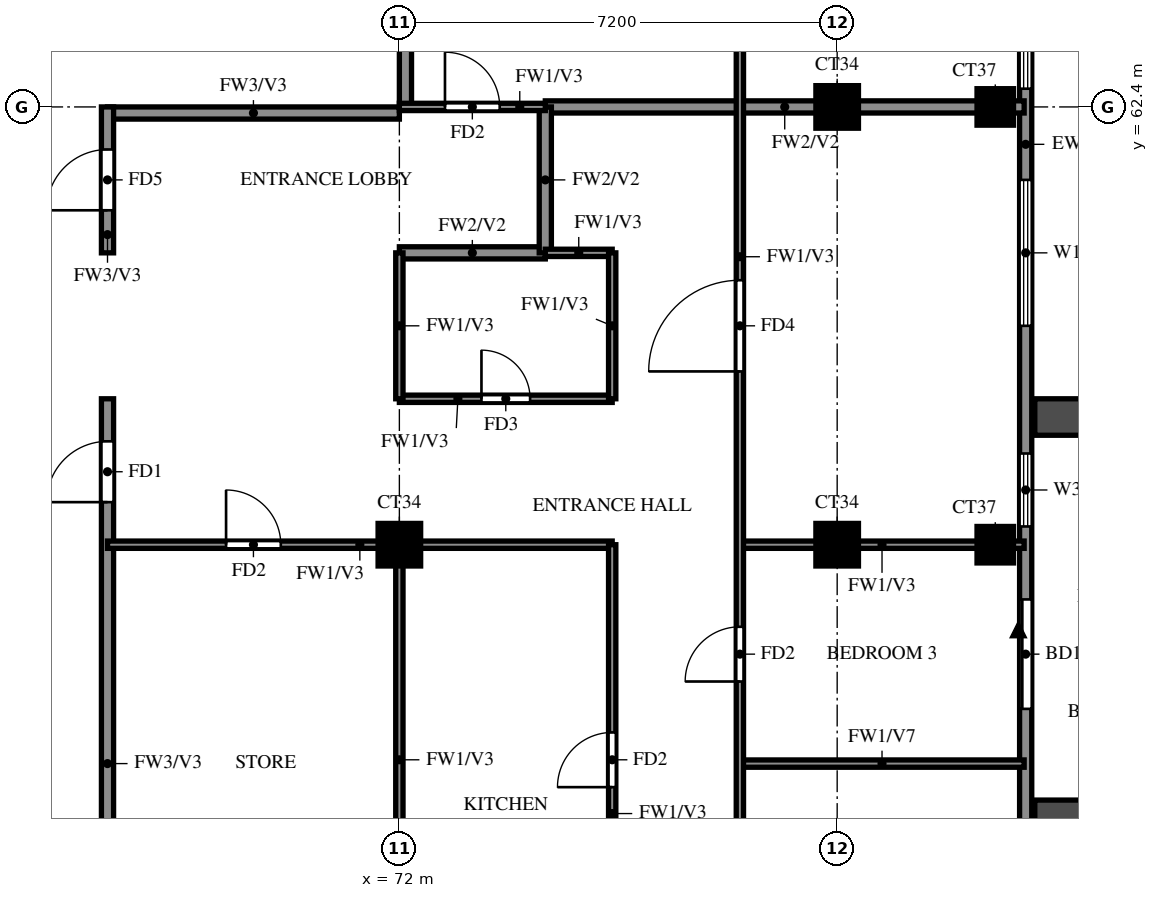
"""IFC4 building model, lengths in metres.
Left out: names, types, materials, properties, quantities, classifications, styles, units other than length and angle.
Written with IfcOpenShell. Run it as: python <this file> out.ifc"""

import sys

from ifc_helpers import new_model, si_unit, direction, frame, frame_2d, origin, origin_2d, place, context, subcontext, project, spatial, rectangle, extrude, source, transform, mapped, element, fill, save


model = new_model("IFC4")
c1 = context("Model", 3, precision=1e-05, world=origin(), true_north=direction((0.0, 1.0)))
c2 = subcontext(c1, "Body", "Model", "MODEL_VIEW")
j1 = project(units=[si_unit("LENGTHUNIT", "METRE"), si_unit("PLANEANGLEUNIT", "RADIAN")], contexts=[c1])
p1 = place(None, origin())
s1 = spatial("IfcSite", under=j1, at=p1, CompositionType="ELEMENT")
p2 = place(p1, origin())
s2 = spatial("IfcBuilding", under=s1, at=p2, CompositionType="ELEMENT")
p3 = place(p2, frame((0.0, 0.0, 253.5)))
s3 = spatial("IfcBuildingStorey", under=s2, at=p3, CompositionType="ELEMENT", Elevation=253.5)
m1 = source(origin(), c2, "Body", "SweptSolid", [
    extrude(rectangle(XDim=0.7, YDim=0.7, at=origin_2d()), origin(), (0.0, 0.0, 1.0), 3.22),
])
for number, where, z_axis, x_axis in (
    (1, (72.0, 55.2, 0.0), (0.0, 0.0, 1.0), (1.0, 0.0, 0.0)),
    (2, (79.2, 55.2, 0.0), (0.0, 0.0, 1.0), (1.0, 0.0, 0.0)),
):
    element("IfcColumn", number, at=place(p3, frame(where, z_axis=z_axis, x_axis=x_axis)), inside=s3, PredefinedType="COLUMN", context=c2, shape_type="MappedRepresentation", body=[
        mapped(m1, transform((0.0, 0.0, 0.0))),
    ])
m2 = source(origin(), c2, "Body", "SweptSolid", [
    extrude(rectangle(XDim=0.6, YDim=0.6, at=origin_2d()), origin(), (0.0, 0.0, 1.0), 3.22),
])
p4 = place(p3, frame((81.8, 55.2, 0.0), z_axis=(0.0, 0.0, 1.0), x_axis=(1.0, 0.0, 0.0)))
e3 = element("IfcColumn", 3, at=p4, inside=s3, PredefinedType="COLUMN", context=c2, shape_type="MappedRepresentation", body=[
    mapped(m2, transform((0.0, 0.0, 0.0))),
])
p5 = place(p3, frame((79.2, 62.4, 0.0), z_axis=(0.0, 0.0, 1.0), x_axis=(1.0, 0.0, 0.0)))
e4 = element("IfcColumn", 4, at=p5, inside=s3, PredefinedType="COLUMN", context=c2, shape_type="MappedRepresentation", body=[
    mapped(m1, transform((0.0, 0.0, 0.0))),
])
p6 = place(p3, frame((81.8, 62.4, 0.0), z_axis=(0.0, 0.0, 1.0), x_axis=(1.0, 0.0, 0.0)))
e5 = element("IfcColumn", 5, at=p6, inside=s3, PredefinedType="COLUMN", context=c2, shape_type="MappedRepresentation", body=[
    mapped(m2, transform((0.0, 0.0, 0.0))),
])
p7 = place(p3, frame((82.3, 48.2, 0.0), z_axis=(0.0, 0.0, 1.0), x_axis=(0.0, 1.0, 0.0)))
e6 = element("IfcWall", 6, at=p7, inside=s3, PredefinedType="SOLIDWALL", context=c2, shape_type="SweptSolid", body=[
    extrude(rectangle(XDim=28.6, YDim=0.2, at=frame_2d((14.3, 0.0))), origin(), (0.0, 0.0, 1.0), 3.22),
])
p8 = place(p7, frame((4.3, 0.0, 0.0)))
e7 = element("IfcOpeningElement", 7, at=p8, cuts=e6, PredefinedType="OPENING", context=c2, shape_type="SweptSolid", body=[
    extrude(rectangle(XDim=1.8, YDim=2.4, at=frame_2d((0.9, 1.2))), frame((0.0, 0.11, 0.0), z_axis=(0.0, -1.0, 0.0), x_axis=(1.0, 0.0, 0.0)), (0.0, 0.0, 1.0), 0.22),
])
p9 = place(p7, frame((18.7, 0.0, 0.0)))
e8 = element("IfcOpeningElement", 8, at=p9, cuts=e6, PredefinedType="OPENING", context=c2, shape_type="SweptSolid", body=[
    extrude(rectangle(XDim=1.8, YDim=2.4, at=frame_2d((0.9, 1.2))), frame((0.0, 0.11, 0.0), z_axis=(0.0, -1.0, 0.0), x_axis=(1.0, 0.0, 0.0)), (0.0, 0.0, 1.0), 0.22),
])
p10 = place(p7, frame((0.6, 0.0, 0.6)))
e9 = element("IfcOpeningElement", 9, at=p10, cuts=e6, PredefinedType="OPENING", context=c2, shape_type="SweptSolid", body=[
    extrude(rectangle(XDim=1.2, YDim=2.4, at=frame_2d((0.6, 1.2))), frame((0.0, 0.11, 0.0), z_axis=(0.0, -1.0, 0.0), x_axis=(1.0, 0.0, 0.0)), (0.0, 0.0, 1.0), 0.22),
])
p11 = place(p7, frame((7.3, 0.0, 0.6)))
e10 = element("IfcOpeningElement", 10, at=p11, cuts=e6, PredefinedType="OPENING", context=c2, shape_type="SweptSolid", body=[
    extrude(rectangle(XDim=1.2, YDim=2.4, at=frame_2d((0.6, 1.2))), frame((0.0, 0.11, 0.0), z_axis=(0.0, -1.0, 0.0), x_axis=(1.0, 0.0, 0.0)), (0.0, 0.0, 1.0), 0.22),
])
p12 = place(p7, frame((10.6, 0.0, 0.6)))
e11 = element("IfcOpeningElement", 11, at=p12, cuts=e6, PredefinedType="OPENING", context=c2, shape_type="SweptSolid", body=[
    extrude(rectangle(XDim=2.4, YDim=2.4, at=frame_2d((1.2, 1.2))), frame((0.0, 0.11, 0.0), z_axis=(0.0, -1.0, 0.0), x_axis=(1.0, 0.0, 0.0)), (0.0, 0.0, 1.0), 0.22),
])
p13 = place(p7, frame((14.5, 0.0, 0.6)))
e12 = element("IfcOpeningElement", 12, at=p13, cuts=e6, PredefinedType="OPENING", context=c2, shape_type="SweptSolid", body=[
    extrude(rectangle(XDim=1.8, YDim=2.4, at=frame_2d((0.9, 1.2))), frame((0.0, 0.11, 0.0), z_axis=(0.0, -1.0, 0.0), x_axis=(1.0, 0.0, 0.0)), (0.0, 0.0, 1.0), 0.22),
])
p14 = place(p7, frame((21.85, 0.0, 1.5)))
e13 = element("IfcOpeningElement", 13, at=p14, cuts=e6, PredefinedType="OPENING", context=c2, shape_type="SweptSolid", body=[
    extrude(rectangle(XDim=0.9, YDim=0.9, at=frame_2d((0.45, 0.45))), frame((0.0, 0.11, 0.0), z_axis=(0.0, -1.0, 0.0), x_axis=(1.0, 0.0, 0.0)), (0.0, 0.0, 1.0), 0.22),
])
p15 = place(p7, frame((23.95, 0.0, 1.5)))
e14 = element("IfcOpeningElement", 14, at=p15, cuts=e6, PredefinedType="OPENING", context=c2, shape_type="SweptSolid", body=[
    extrude(rectangle(XDim=0.9, YDim=0.9, at=frame_2d((0.45, 0.45))), frame((0.0, 0.11, 0.0), z_axis=(0.0, -1.0, 0.0), x_axis=(1.0, 0.0, 0.0)), (0.0, 0.0, 1.0), 0.22),
])
p16 = place(p7, frame((25.5, 0.0, 0.6)))
e15 = element("IfcOpeningElement", 15, at=p16, cuts=e6, PredefinedType="OPENING", context=c2, shape_type="SweptSolid", body=[
    extrude(rectangle(XDim=2.4, YDim=2.4, at=frame_2d((1.2, 1.2))), frame((0.0, 0.11, 0.0), z_axis=(0.0, -1.0, 0.0), x_axis=(1.0, 0.0, 0.0)), (0.0, 0.0, 1.0), 0.22),
])
for number, where, z_axis, x_axis in (
    (16, (82.45, 50.7, 0.0), (0.0, 0.0, 1.0), (1.0, 0.0, 0.0)),
    (17, (82.45, 57.3, 0.0), (0.0, 0.0, 1.0), (1.0, 0.0, 0.0)),
):
    element("IfcWall", number, at=place(p3, frame(where, z_axis=z_axis, x_axis=x_axis)), inside=s3, PredefinedType="SOLIDWALL", context=c2, shape_type="SweptSolid", body=[
        extrude(rectangle(XDim=2.65, YDim=0.6, at=frame_2d((1.325, 0.0))), origin(), (0.0, 0.0, 1.0), 2.85),
    ])
p17 = place(p3, frame((67.2, 62.3, 0.0), z_axis=(0.0, 0.0, 1.0), x_axis=(1.0, 0.0, 0.0)))
e18 = element("IfcWall", 18, at=p17, inside=s3, PredefinedType="SOLIDWALL", context=c2, shape_type="SweptSolid", body=[
    extrude(rectangle(XDim=4.8, YDim=0.2, at=frame_2d((2.4, 0.0))), origin(), (0.0, 0.0, 1.0), 3.22),
])
p18 = place(p3, frame((67.2, 45.6, 0.0), z_axis=(0.0, 0.0, 1.0), x_axis=(0.0, 1.0, 0.0)))
e19 = element("IfcWall", 19, at=p18, inside=s3, PredefinedType="SOLIDWALL", context=c2, shape_type="SweptSolid", body=[
    extrude(rectangle(XDim=12.0, YDim=0.2, at=frame_2d((6.0, 0.0))), origin(), (0.0, 0.0, 1.0), 3.22),
])
p19 = place(p18, frame((10.3, 0.0, 0.0)))
e20 = element("IfcOpeningElement", 20, at=p19, cuts=e19, PredefinedType="OPENING", context=c2, shape_type="SweptSolid", body=[
    extrude(rectangle(XDim=1.0, YDim=2.1, at=frame_2d((0.5, 1.05))), frame((0.0, 0.11, 0.0), z_axis=(0.0, -1.0, 0.0), x_axis=(1.0, 0.0, 0.0)), (0.0, 0.0, 1.0), 0.22),
])
p20 = place(p18, frame((0.7, 0.0, 0.0)))
e21 = element("IfcOpeningElement", 21, at=p20, cuts=e19, PredefinedType="OPENING", context=c2, shape_type="SweptSolid", body=[
    extrude(rectangle(XDim=1.0, YDim=2.1, at=frame_2d((0.5, 1.05))), frame((0.0, 0.11, 0.0), z_axis=(0.0, -1.0, 0.0), x_axis=(1.0, 0.0, 0.0)), (0.0, 0.0, 1.0), 0.22),
])
p21 = place(p3, frame((67.2, 60.0, 0.0), z_axis=(0.0, 0.0, 1.0), x_axis=(0.0, 1.0, 0.0)))
e22 = element("IfcWall", 22, at=p21, inside=s3, PredefinedType="SOLIDWALL", context=c2, shape_type="SweptSolid", body=[
    extrude(rectangle(XDim=2.4, YDim=0.2, at=frame_2d((1.2, 0.0))), origin(), (0.0, 0.0, 1.0), 3.22),
])
p22 = place(p21, frame((0.7, 0.0, 0.0)))
e23 = element("IfcOpeningElement", 23, at=p22, cuts=e22, PredefinedType="OPENING", context=c2, shape_type="SweptSolid", body=[
    extrude(rectangle(XDim=1.0, YDim=2.1, at=frame_2d((0.5, 1.05))), frame((0.0, 0.11, 0.0), z_axis=(0.0, -1.0, 0.0), x_axis=(1.0, 0.0, 0.0)), (0.0, 0.0, 1.0), 0.22),
])
p23 = place(p3, frame((72.1, 62.4, 0.0), z_axis=(0.0, 0.0, 1.0), x_axis=(0.0, 1.0, 0.0)))
e24 = element("IfcWall", 24, at=p23, inside=s3, PredefinedType="SOLIDWALL", context=c2, shape_type="SweptSolid", body=[
    extrude(rectangle(XDim=15.6, YDim=0.2, at=frame_2d((7.8, 0.0))), origin(), (0.0, 0.0, 1.0), 3.22),
])
p24 = place(p3, frame((72.0, 60.0, 0.0), z_axis=(0.0, 0.0, 1.0), x_axis=(1.0, 0.0, 0.0)))
e25 = element("IfcWall", 25, at=p24, inside=s3, PredefinedType="SOLIDWALL", context=c2, shape_type="SweptSolid", body=[
    extrude(rectangle(XDim=2.4, YDim=0.2, at=frame_2d((1.2, 0.0))), origin(), (0.0, 0.0, 1.0), 3.22),
])
p25 = place(p3, frame((74.4, 62.4, 0.0), z_axis=(0.0, 0.0, 1.0), x_axis=(1.0, 0.0, 0.0)))
e26 = element("IfcWall", 26, at=p25, inside=s3, PredefinedType="SOLIDWALL", context=c2, shape_type="SweptSolid", body=[
    extrude(rectangle(XDim=7.875, YDim=0.2, at=frame_2d((3.938, 0.0))), origin(), (0.0, 0.0, 1.0), 3.22),
])
p26 = place(p3, frame((74.4, 60.0, 0.0), z_axis=(0.0, 0.0, 1.0), x_axis=(0.0, 1.0, 0.0)))
e27 = element("IfcWall", 27, at=p26, inside=s3, PredefinedType="SOLIDWALL", context=c2, shape_type="SweptSolid", body=[
    extrude(rectangle(XDim=2.4, YDim=0.2, at=frame_2d((1.2, 0.0))), origin(), (0.0, 0.0, 1.0), 3.22),
])
p27 = place(p3, frame((77.6, 51.6, 0.0), z_axis=(0.0, 0.0, 1.0), x_axis=(1.0, 0.0, 0.0)))
e28 = element("IfcWall", 28, at=p27, inside=s3, PredefinedType="PARTITIONING", context=c2, shape_type="SweptSolid", body=[
    extrude(rectangle(XDim=4.675, YDim=0.12, at=frame_2d((2.337, 0.0))), origin(), (0.0, 0.0, 1.0), 2.32),
])
p28 = place(p3, frame((67.2, 55.2, 0.0), z_axis=(0.0, 0.0, 1.0), x_axis=(1.0, 0.0, 0.0)))
e29 = element("IfcWall", 29, at=p28, inside=s3, PredefinedType="PARTITIONING", context=c2, shape_type="SweptSolid", body=[
    extrude(rectangle(XDim=8.3, YDim=0.12, at=frame_2d((4.15, 0.0))), origin(), (0.0, 0.0, 1.0), 3.22),
])
p29 = place(p28, frame((1.95, 0.0, 0.0)))
e30 = element("IfcOpeningElement", 30, at=p29, cuts=e29, PredefinedType="OPENING", context=c2, shape_type="SweptSolid", body=[
    extrude(rectangle(XDim=0.9, YDim=2.1, at=frame_2d((0.45, 1.05))), frame((0.0, 0.07, 0.0), z_axis=(0.0, -1.0, 0.0), x_axis=(1.0, 0.0, 0.0)), (0.0, 0.0, 1.0), 0.14),
])
p30 = place(p3, frame((77.6, 55.2, 0.0), z_axis=(0.0, 0.0, 1.0), x_axis=(1.0, 0.0, 0.0)))
e31 = element("IfcWall", 31, at=p30, inside=s3, PredefinedType="PARTITIONING", context=c2, shape_type="SweptSolid", body=[
    extrude(rectangle(XDim=4.675, YDim=0.12, at=frame_2d((2.337, 0.0))), origin(), (0.0, 0.0, 1.0), 3.22),
])
p31 = place(p3, frame((72.0, 57.6, 0.0), z_axis=(0.0, 0.0, 1.0), x_axis=(1.0, 0.0, 0.0)))
e32 = element("IfcWall", 32, at=p31, inside=s3, PredefinedType="PARTITIONING", context=c2, shape_type="SweptSolid", body=[
    extrude(rectangle(XDim=3.5, YDim=0.12, at=frame_2d((1.75, 0.0))), origin(), (0.0, 0.0, 1.0), 3.22),
])
p32 = place(p31, frame((1.35, 0.0, 0.0)))
e33 = element("IfcOpeningElement", 33, at=p32, cuts=e32, PredefinedType="OPENING", context=c2, shape_type="SweptSolid", body=[
    extrude(rectangle(XDim=0.8, YDim=2.1, at=frame_2d((0.4, 1.05))), frame((0.0, 0.07, 0.0), z_axis=(0.0, -1.0, 0.0), x_axis=(1.0, 0.0, 0.0)), (0.0, 0.0, 1.0), 0.14),
])
p33 = place(p3, frame((74.4, 60.0, 0.0), z_axis=(0.0, 0.0, 1.0), x_axis=(1.0, 0.0, 0.0)))
e34 = element("IfcWall", 34, at=p33, inside=s3, PredefinedType="PARTITIONING", context=c2, shape_type="SweptSolid", body=[
    extrude(rectangle(XDim=1.1, YDim=0.12, at=frame_2d((0.55, 0.0))), origin(), (0.0, 0.0, 1.0), 3.22),
])
p34 = place(p3, frame((72.0, 62.4, 0.0), z_axis=(0.0, 0.0, 1.0), x_axis=(1.0, 0.0, 0.0)))
e35 = element("IfcWall", 35, at=p34, inside=s3, PredefinedType="PARTITIONING", context=c2, shape_type="SweptSolid", body=[
    extrude(rectangle(XDim=2.4, YDim=0.12, at=frame_2d((1.2, 0.0))), origin(), (0.0, 0.0, 1.0), 3.22),
])
p35 = place(p34, frame((0.75, 0.0, 0.0)))
e36 = element("IfcOpeningElement", 36, at=p35, cuts=e35, PredefinedType="OPENING", context=c2, shape_type="SweptSolid", body=[
    extrude(rectangle(XDim=0.9, YDim=2.1, at=frame_2d((0.45, 1.05))), frame((0.0, 0.07, 0.0), z_axis=(0.0, -1.0, 0.0), x_axis=(1.0, 0.0, 0.0)), (0.0, 0.0, 1.0), 0.14),
])
p36 = place(p3, frame((72.0, 48.125, 0.0), z_axis=(0.0, 0.0, 1.0), x_axis=(0.0, 1.0, 0.0)))
e37 = element("IfcWall", 37, at=p36, inside=s3, PredefinedType="PARTITIONING", context=c2, shape_type="SweptSolid", body=[
    extrude(rectangle(XDim=7.075, YDim=0.12, at=frame_2d((3.538, 0.0))), origin(), (0.0, 0.0, 1.0), 3.22),
])
p37 = place(p3, frame((72.0, 57.6, 0.0), z_axis=(0.0, 0.0, 1.0), x_axis=(0.0, 1.0, 0.0)))
e38 = element("IfcWall", 38, at=p37, inside=s3, PredefinedType="PARTITIONING", context=c2, shape_type="SweptSolid", body=[
    extrude(rectangle(XDim=2.4, YDim=0.12, at=frame_2d((1.2, 0.0))), origin(), (0.0, 0.0, 1.0), 3.22),
])
p38 = place(p3, frame((75.5, 48.125, 0.0), z_axis=(0.0, 0.0, 1.0), x_axis=(0.0, 1.0, 0.0)))
e39 = element("IfcWall", 39, at=p38, inside=s3, PredefinedType="PARTITIONING", context=c2, shape_type="SweptSolid", body=[
    extrude(rectangle(XDim=7.075, YDim=0.12, at=frame_2d((3.538, 0.0))), origin(), (0.0, 0.0, 1.0), 3.22),
])
p39 = place(p38, frame((3.087, 0.0, 0.0)))
e40 = element("IfcOpeningElement", 40, at=p39, cuts=e39, PredefinedType="OPENING", context=c2, shape_type="SweptSolid", body=[
    extrude(rectangle(XDim=0.9, YDim=2.1, at=frame_2d((0.45, 1.05))), frame((0.0, 0.07, 0.0), z_axis=(0.0, -1.0, 0.0), x_axis=(1.0, 0.0, 0.0)), (0.0, 0.0, 1.0), 0.14),
])
p40 = place(p3, frame((75.5, 57.6, 0.0), z_axis=(0.0, 0.0, 1.0), x_axis=(0.0, 1.0, 0.0)))
e41 = element("IfcWall", 41, at=p40, inside=s3, PredefinedType="PARTITIONING", context=c2, shape_type="SweptSolid", body=[
    extrude(rectangle(XDim=2.4, YDim=0.12, at=frame_2d((1.2, 0.0))), origin(), (0.0, 0.0, 1.0), 3.22),
])
p41 = place(p3, frame((77.6, 48.125, 0.0), z_axis=(0.0, 0.0, 1.0), x_axis=(0.0, 1.0, 0.0)))
e42 = element("IfcWall", 42, at=p41, inside=s3, PredefinedType="PARTITIONING", context=c2, shape_type="SweptSolid", body=[
    extrude(rectangle(XDim=21.475, YDim=0.12, at=frame_2d((10.738, 0.0))), origin(), (0.0, 0.0, 1.0), 3.22),
])
p42 = place(p41, frame((1.288, 0.0, 0.0)))
e43 = element("IfcOpeningElement", 43, at=p42, cuts=e42, PredefinedType="OPENING", context=c2, shape_type="SweptSolid", body=[
    extrude(rectangle(XDim=0.9, YDim=2.1, at=frame_2d((0.45, 1.05))), frame((0.0, 0.07, 0.0), z_axis=(0.0, -1.0, 0.0), x_axis=(1.0, 0.0, 0.0)), (0.0, 0.0, 1.0), 0.14),
])
p43 = place(p41, frame((4.825, 0.0, 0.0)))
e44 = element("IfcOpeningElement", 44, at=p43, cuts=e42, PredefinedType="OPENING", context=c2, shape_type="SweptSolid", body=[
    extrude(rectangle(XDim=0.9, YDim=2.1, at=frame_2d((0.45, 1.05))), frame((0.0, 0.07, 0.0), z_axis=(0.0, -1.0, 0.0), x_axis=(1.0, 0.0, 0.0)), (0.0, 0.0, 1.0), 0.14),
])
p44 = place(p41, frame((9.925, 0.0, 0.0)))
e45 = element("IfcOpeningElement", 45, at=p44, cuts=e42, PredefinedType="OPENING", context=c2, shape_type="SweptSolid", body=[
    extrude(rectangle(XDim=1.5, YDim=2.1, at=frame_2d((0.75, 1.05))), frame((0.0, 0.07, 0.0), z_axis=(0.0, -1.0, 0.0), x_axis=(1.0, 0.0, 0.0)), (0.0, 0.0, 1.0), 0.14),
])
p45 = place(p41, frame((15.625, 0.0, 0.0)))
e46 = element("IfcOpeningElement", 46, at=p45, cuts=e42, PredefinedType="OPENING", context=c2, shape_type="SweptSolid", body=[
    extrude(rectangle(XDim=0.9, YDim=2.1, at=frame_2d((0.45, 1.05))), frame((0.0, 0.07, 0.0), z_axis=(0.0, -1.0, 0.0), x_axis=(1.0, 0.0, 0.0)), (0.0, 0.0, 1.0), 0.14),
])
p46 = place(p41, frame((19.225, 0.0, 0.0)))
e47 = element("IfcOpeningElement", 47, at=p46, cuts=e42, PredefinedType="OPENING", context=c2, shape_type="SweptSolid", body=[
    extrude(rectangle(XDim=0.9, YDim=2.1, at=frame_2d((0.45, 1.05))), frame((0.0, 0.07, 0.0), z_axis=(0.0, -1.0, 0.0), x_axis=(1.0, 0.0, 0.0)), (0.0, 0.0, 1.0), 0.14),
])
p47 = place(p8, origin())
e48 = element("IfcDoor", 48, at=p47, inside=s3, OperationType="DOUBLE_DOOR_SLIDING", PredefinedType="DOOR", context=c2, shape_type="SweptSolid", body=[
    extrude(rectangle(XDim=1.8, YDim=2.4, at=frame_2d((0.9, 1.2))), frame((0.0, 0.025, 0.0), z_axis=(0.0, -1.0, 0.0), x_axis=(1.0, 0.0, 0.0)), (0.0, 0.0, 1.0), 0.05),
])
fill(e7, e48)
p48 = place(p11, origin())
e49 = element("IfcWindow", 49, at=p48, inside=s3, PartitioningType="SINGLE_PANEL", PredefinedType="WINDOW", context=c2, shape_type="SweptSolid", body=[
    extrude(rectangle(XDim=1.2, YDim=2.4, at=frame_2d((0.6, 1.2))), frame((0.0, 0.03, 0.0), z_axis=(0.0, -1.0, 0.0), x_axis=(1.0, 0.0, 0.0)), (0.0, 0.0, 1.0), 0.06),
])
fill(e10, e49)
p49 = place(p12, origin())
e50 = element("IfcWindow", 50, at=p49, inside=s3, PartitioningType="DOUBLE_PANEL_VERTICAL", PredefinedType="WINDOW", context=c2, shape_type="SweptSolid", body=[
    extrude(rectangle(XDim=2.4, YDim=2.4, at=frame_2d((1.2, 1.2))), frame((0.0, 0.03, 0.0), z_axis=(0.0, -1.0, 0.0), x_axis=(1.0, 0.0, 0.0)), (0.0, 0.0, 1.0), 0.06),
])
fill(e11, e50)
p50 = place(p13, origin())
e51 = element("IfcWindow", 51, at=p50, inside=s3, PartitioningType="DOUBLE_PANEL_VERTICAL", PredefinedType="WINDOW", context=c2, shape_type="SweptSolid", body=[
    extrude(rectangle(XDim=1.8, YDim=2.4, at=frame_2d((0.9, 1.2))), frame((0.0, 0.03, 0.0), z_axis=(0.0, -1.0, 0.0), x_axis=(1.0, 0.0, 0.0)), (0.0, 0.0, 1.0), 0.06),
])
fill(e12, e51)
p51 = place(p19, origin())
e52 = element("IfcDoor", 52, at=p51, inside=s3, OperationType="SINGLE_SWING_LEFT", PredefinedType="DOOR", context=c2, shape_type="SweptSolid", body=[
    extrude(rectangle(XDim=1.0, YDim=2.1, at=frame_2d((0.5, 1.05))), frame((0.0, 0.025, 0.0), z_axis=(0.0, -1.0, 0.0), x_axis=(1.0, 0.0, 0.0)), (0.0, 0.0, 1.0), 0.05),
])
fill(e20, e52)
p52 = place(p43, origin())
e53 = element("IfcDoor", 53, at=p52, inside=s3, OperationType="SINGLE_SWING_LEFT", PredefinedType="DOOR", context=c2, shape_type="SweptSolid", body=[
    extrude(rectangle(XDim=0.9, YDim=2.1, at=frame_2d((0.45, 1.05))), frame((0.0, 0.025, 0.0), z_axis=(0.0, -1.0, 0.0), x_axis=(1.0, 0.0, 0.0)), (0.0, 0.0, 1.0), 0.05),
])
fill(e44, e53)
p53 = place(p44, origin())
e54 = element("IfcDoor", 54, at=p53, inside=s3, OperationType="SINGLE_SWING_LEFT", PredefinedType="DOOR", context=c2, shape_type="SweptSolid", body=[
    extrude(rectangle(XDim=1.5, YDim=2.1, at=frame_2d((0.75, 1.05))), frame((0.0, 0.025, 0.0), z_axis=(0.0, -1.0, 0.0), x_axis=(1.0, 0.0, 0.0)), (0.0, 0.0, 1.0), 0.05),
])
fill(e45, e54)
p54 = place(p39, origin())
e55 = element("IfcDoor", 55, at=p54, inside=s3, OperationType="SINGLE_SWING_RIGHT", PredefinedType="DOOR", context=c2, shape_type="SweptSolid", body=[
    extrude(rectangle(XDim=0.9, YDim=2.1, at=frame_2d((0.45, 1.05))), frame((0.0, 0.025, 0.0), z_axis=(0.0, -1.0, 0.0), x_axis=(1.0, 0.0, 0.0)), (0.0, 0.0, 1.0), 0.05),
])
fill(e40, e55)
p55 = place(p32, origin())
e56 = element("IfcDoor", 56, at=p55, inside=s3, OperationType="SINGLE_SWING_LEFT", PredefinedType="DOOR", context=c2, shape_type="SweptSolid", body=[
    extrude(rectangle(XDim=0.8, YDim=2.1, at=frame_2d((0.4, 1.05))), frame((0.0, 0.025, 0.0), z_axis=(0.0, -1.0, 0.0), x_axis=(1.0, 0.0, 0.0)), (0.0, 0.0, 1.0), 0.05),
])
fill(e33, e56)
p56 = place(p29, origin())
e57 = element("IfcDoor", 57, at=p56, inside=s3, OperationType="SINGLE_SWING_LEFT", PredefinedType="DOOR", context=c2, shape_type="SweptSolid", body=[
    extrude(rectangle(XDim=0.9, YDim=2.1, at=frame_2d((0.45, 1.05))), frame((0.0, 0.025, 0.0), z_axis=(0.0, -1.0, 0.0), x_axis=(1.0, 0.0, 0.0)), (0.0, 0.0, 1.0), 0.05),
])
fill(e30, e57)
p57 = place(p35, origin())
e58 = element("IfcDoor", 58, at=p57, inside=s3, OperationType="SINGLE_SWING_RIGHT", PredefinedType="DOOR", context=c2, shape_type="SweptSolid", body=[
    extrude(rectangle(XDim=0.9, YDim=2.1, at=frame_2d((0.45, 1.05))), frame((0.0, 0.025, 0.0), z_axis=(0.0, -1.0, 0.0), x_axis=(1.0, 0.0, 0.0)), (0.0, 0.0, 1.0), 0.05),
])
fill(e36, e58)
p58 = place(p22, origin())
e59 = element("IfcDoor", 59, at=p58, inside=s3, OperationType="SINGLE_SWING_LEFT", PredefinedType="DOOR", context=c2, shape_type="SweptSolid", body=[
    extrude(rectangle(XDim=1.0, YDim=2.1, at=frame_2d((0.5, 1.05))), frame((0.0, 0.025, 0.0), z_axis=(0.0, -1.0, 0.0), x_axis=(1.0, 0.0, 0.0)), (0.0, 0.0, 1.0), 0.05),
])
fill(e23, e59)
save(model, sys.argv[1])
